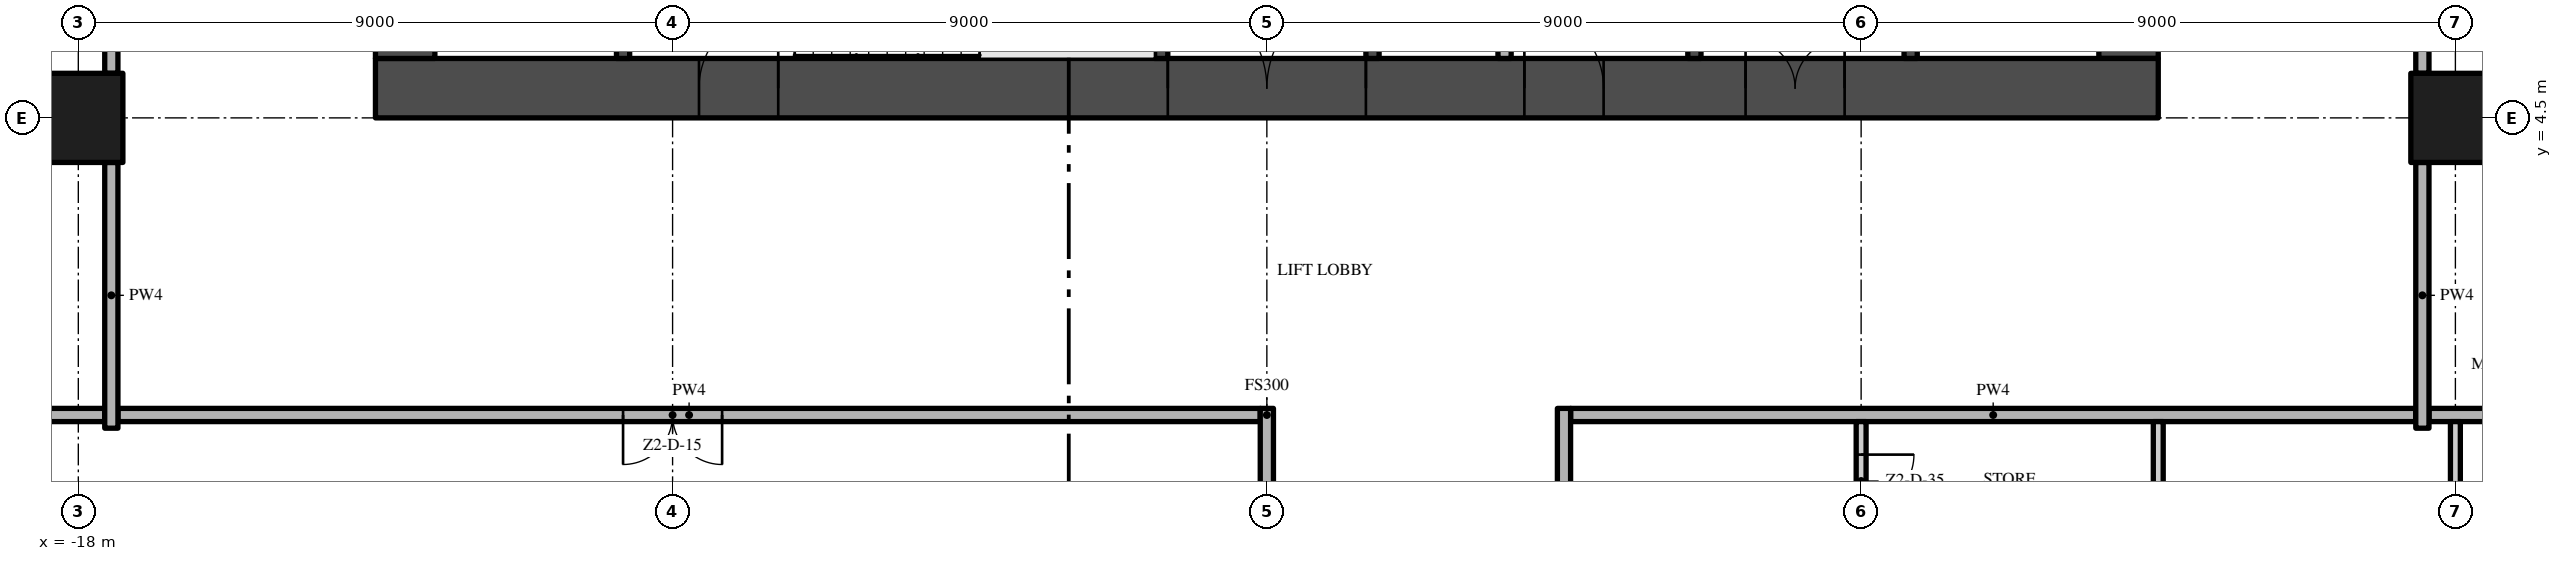
"""IFC4 building model, lengths in metres.
Left out: names, types, materials, properties, quantities, classifications, styles, units other than length and angle.
Written with IfcOpenShell. Run it as: python <this file> out.ifc"""

import sys

from ifc_helpers import new_model, si_unit, direction, frame, frame_2d, origin, origin_2d, place, context, subcontext, project, spatial, rectangle, extrude, element, fill, save


model = new_model("IFC4")
c1 = context("Model", 3, precision=1e-05, world=origin(), true_north=direction((0.0, 1.0)))
c2 = subcontext(c1, "Body", "Model", "MODEL_VIEW")
j1 = project(units=[si_unit("LENGTHUNIT", "METRE"), si_unit("PLANEANGLEUNIT", "RADIAN")], contexts=[c1])
p1 = place(None, origin())
s1 = spatial("IfcSite", under=j1, at=p1, CompositionType="ELEMENT")
p2 = place(p1, origin())
s2 = spatial("IfcBuilding", under=s1, at=p2, CompositionType="ELEMENT")
p3 = place(p2, frame((0.0, 0.0, 111.2)))
s3 = spatial("IfcBuildingStorey", under=s2, at=p3, CompositionType="ELEMENT", Elevation=111.2)
p4 = place(p3, frame((-13.5, 4.95, -0.3), z_axis=(0.0, 0.0, 1.0), x_axis=(1.0, 0.0, 0.0)))
e1 = element("IfcWall", 1, at=p4, inside=s3, PredefinedType="SHEAR", context=c2, shape_type="SweptSolid", body=[
    extrude(rectangle(XDim=27.0, YDim=0.9, at=frame_2d((13.5, 0.0))), origin(), (0.0, 0.0, 1.0), 3.8),
])
p5 = place(p4, frame((12.0, 0.0, 0.3)))
e2 = element("IfcOpeningElement", 2, at=p5, cuts=e1, PredefinedType="OPENING", context=c2, shape_type="SweptSolid", body=[
    extrude(rectangle(XDim=3.0, YDim=2.4, at=frame_2d((1.5, 1.2))), frame((0.0, 0.46, 0.0), z_axis=(0.0, -1.0, 0.0), x_axis=(1.0, 0.0, 0.0)), (0.0, 0.0, 1.0), 0.92),
])
p6 = place(p4, frame((4.9, 0.0, 0.3)))
e3 = element("IfcOpeningElement", 3, at=p6, cuts=e1, PredefinedType="OPENING", context=c2, shape_type="SweptSolid", body=[
    extrude(rectangle(XDim=1.2, YDim=2.2, at=frame_2d((0.6, 1.1))), frame((0.0, 0.46, 0.0), z_axis=(0.0, -1.0, 0.0), x_axis=(1.0, 0.0, 0.0)), (0.0, 0.0, 1.0), 0.92),
])
p7 = place(p4, frame((20.75, 0.0, 0.3)))
e4 = element("IfcOpeningElement", 4, at=p7, cuts=e1, PredefinedType="OPENING", context=c2, shape_type="SweptSolid", body=[
    extrude(rectangle(XDim=1.5, YDim=2.2, at=frame_2d((0.75, 1.1))), frame((0.0, 0.46, 0.0), z_axis=(0.0, -1.0, 0.0), x_axis=(1.0, 0.0, 0.0)), (0.0, 0.0, 1.0), 0.92),
])
p8 = place(p4, frame((17.4, 0.0, 0.3)))
e5 = element("IfcOpeningElement", 5, at=p8, cuts=e1, PredefinedType="OPENING", context=c2, shape_type="SweptSolid", body=[
    extrude(rectangle(XDim=1.2, YDim=2.2, at=frame_2d((0.6, 1.1))), frame((0.0, 0.46, 0.0), z_axis=(0.0, -1.0, 0.0), x_axis=(1.0, 0.0, 0.0)), (0.0, 0.0, 1.0), 0.92),
])
p9 = place(p3, frame((13.05, 5.4, -0.3), z_axis=(0.0, 0.0, 1.0), x_axis=(0.0, 1.0, 0.0)))
e6 = element("IfcWall", 6, at=p9, inside=s3, PredefinedType="SHEAR", context=c2, shape_type="SweptSolid", body=[
    extrude(rectangle(XDim=16.2, YDim=0.9, at=frame_2d((8.1, 0.0))), origin(), (0.0, 0.0, 1.0), 3.8),
])
p10 = place(p9, frame((6.0, 0.0, 0.3)))
e7 = element("IfcOpeningElement", 7, at=p10, cuts=e6, PredefinedType="OPENING", context=c2, shape_type="SweptSolid", body=[
    extrude(rectangle(XDim=1.2, YDim=2.2, at=frame_2d((0.6, 1.1))), frame((0.0, 0.46, 0.0), z_axis=(0.0, -1.0, 0.0), x_axis=(1.0, 0.0, 0.0)), (0.0, 0.0, 1.0), 0.92),
])
p11 = place(p3, frame((-13.05, 21.6, -0.3), z_axis=(0.0, 0.0, 1.0), x_axis=(0.0, -1.0, 0.0)))
e8 = element("IfcWall", 8, at=p11, inside=s3, PredefinedType="SHEAR", context=c2, shape_type="SweptSolid", body=[
    extrude(rectangle(XDim=16.2, YDim=0.9, at=frame_2d((8.1, 0.0))), origin(), (0.0, 0.0, 1.0), 3.8),
])
p12 = place(p11, frame((9.0, 0.0, 0.3)))
e9 = element("IfcOpeningElement", 9, at=p12, cuts=e8, PredefinedType="OPENING", context=c2, shape_type="SweptSolid", body=[
    extrude(rectangle(XDim=1.2, YDim=2.2, at=frame_2d((0.6, 1.1))), frame((0.0, 0.46, 0.0), z_axis=(0.0, -1.0, 0.0), x_axis=(1.0, 0.0, 0.0)), (0.0, 0.0, 1.0), 0.92),
])
for number, where, z_axis, x_axis in (
    (10, (-18.0, 4.5, 0.0), (0.0, 0.0, 1.0), (1.0, 0.0, 0.0)),
    (11, (18.0, 4.5, 0.0), (0.0, 0.0, 1.0), (1.0, 0.0, 0.0)),
):
    element("IfcColumn", number, at=place(p3, frame(where, z_axis=z_axis, x_axis=x_axis)), inside=s3, PredefinedType="COLUMN", context=c2, shape_type="SweptSolid", body=[
        extrude(rectangle(XDim=1.35, YDim=1.35, at=origin_2d()), origin(), (0.0, 0.0, 1.0), 3.5),
    ])
for number, where, z_axis, x_axis in (
    (12, (-9.75, 5.4, 0.0), (0.0, 0.0, 1.0), (0.0, 1.0, 0.0)),
    (13, (-1.6, 5.4, 0.0), (0.0, 0.0, 1.0), (0.0, 1.0, 0.0)),
):
    element("IfcWall", number, at=place(p3, frame(where, z_axis=z_axis, x_axis=x_axis)), inside=s3, PredefinedType="SHEAR", context=c2, shape_type="SweptSolid", body=[
        extrude(rectangle(XDim=2.55, YDim=0.2, at=frame_2d((1.275, 0.0))), origin(), (0.0, 0.0, 1.0), 3.5),
    ])
p13 = place(p3, frame((1.6, 13.5, 0.0), z_axis=(0.0, 0.0, 1.0), x_axis=(0.0, -1.0, 0.0)))
e14 = element("IfcWall", 14, at=p13, inside=s3, PredefinedType="SHEAR", context=c2, shape_type="SweptSolid", body=[
    extrude(rectangle(XDim=8.1, YDim=0.2, at=frame_2d((4.05, 0.0))), origin(), (0.0, 0.0, 1.0), 3.5),
])
p14 = place(p13, frame((3.2, 0.0, 0.0)))
e15 = element("IfcOpeningElement", 15, at=p14, cuts=e14, PredefinedType="OPENING", context=c2, shape_type="SweptSolid", body=[
    extrude(rectangle(XDim=0.9, YDim=2.1, at=frame_2d((0.45, 1.05))), frame((0.0, 0.11, 0.0), z_axis=(0.0, -1.0, 0.0), x_axis=(1.0, 0.0, 0.0)), (0.0, 0.0, 1.0), 0.22),
])
p15 = place(p3, frame((3.6, 13.5, 0.0), z_axis=(0.0, 0.0, 1.0), x_axis=(0.0, -1.0, 0.0)))
e16 = element("IfcWall", 16, at=p15, inside=s3, PredefinedType="PARTITIONING", context=c2, shape_type="SweptSolid", body=[
    extrude(rectangle(XDim=8.1, YDim=0.2, at=frame_2d((4.05, 0.0))), origin(), (0.0, 0.0, 1.0), 3.5),
])
p16 = place(p15, frame((3.6, 0.0, 0.0)))
e17 = element("IfcOpeningElement", 17, at=p16, cuts=e16, PredefinedType="OPENING", context=c2, shape_type="SweptSolid", body=[
    extrude(rectangle(XDim=0.9, YDim=2.1, at=frame_2d((0.45, 1.05))), frame((0.0, 0.11, 0.0), z_axis=(0.0, -1.0, 0.0), x_axis=(1.0, 0.0, 0.0)), (0.0, 0.0, 1.0), 0.22),
])
p17 = place(p3, frame((6.475, 5.4, 0.0), z_axis=(0.0, 0.0, 1.0), x_axis=(0.0, 1.0, 0.0)))
e18 = element("IfcWall", 18, at=p17, inside=s3, PredefinedType="SHEAR", context=c2, shape_type="SweptSolid", body=[
    extrude(rectangle(XDim=6.7, YDim=0.2, at=frame_2d((3.35, 0.0))), origin(), (0.0, 0.0, 1.0), 3.5),
])
p18 = place(p3, frame((9.75, 5.4, 0.0), z_axis=(0.0, 0.0, 1.0), x_axis=(0.0, 1.0, 0.0)))
e19 = element("IfcWall", 19, at=p18, inside=s3, PredefinedType="SHEAR", context=c2, shape_type="SweptSolid", body=[
    extrude(rectangle(XDim=2.2, YDim=0.2, at=frame_2d((1.1, 0.0))), origin(), (0.0, 0.0, 1.0), 3.5),
])
p19 = place(p18, frame((0.55, 0.0, 0.0)))
e20 = element("IfcOpeningElement", 20, at=p19, cuts=e19, PredefinedType="OPENING", context=c2, shape_type="SweptSolid", body=[
    extrude(rectangle(XDim=1.1, YDim=2.1, at=frame_2d((0.55, 1.05))), frame((0.0, 0.11, 0.0), z_axis=(0.0, -1.0, 0.0), x_axis=(1.0, 0.0, 0.0)), (0.0, 0.0, 1.0), 0.22),
])
p20 = place(p3, frame((-0.1, 0.0, 0.0), z_axis=(0.0, 0.0, 1.0), x_axis=(-1.0, 0.0, 0.0)))
e21 = element("IfcWall", 21, at=p20, inside=s3, PredefinedType="PARTITIONING", context=c2, shape_type="SweptSolid", body=[
    extrude(rectangle(XDim=17.3, YDim=0.2, at=frame_2d((8.65, 0.0))), origin(), (0.0, 0.0, 1.0), 3.5),
])
p21 = place(p20, frame((8.15, 0.0, 0.0)))
e22 = element("IfcOpeningElement", 22, at=p21, cuts=e21, PredefinedType="OPENING", context=c2, shape_type="SweptSolid", body=[
    extrude(rectangle(XDim=1.5, YDim=2.4, at=frame_2d((0.75, 1.2))), frame((0.0, 0.11, 0.0), z_axis=(0.0, -1.0, 0.0), x_axis=(1.0, 0.0, 0.0)), (0.0, 0.0, 1.0), 0.22),
])
p22 = place(p3, frame((4.6, 0.0, 0.0), z_axis=(0.0, 0.0, 1.0), x_axis=(1.0, 0.0, 0.0)))
e23 = element("IfcWall", 23, at=p22, inside=s3, PredefinedType="PARTITIONING", context=c2, shape_type="SweptSolid", body=[
    extrude(rectangle(XDim=12.8, YDim=0.2, at=frame_2d((6.4, 0.0))), origin(), (0.0, 0.0, 1.0), 3.5),
])
for number, where, z_axis, x_axis in (
    (24, (-26.7, 0.0, 0.0), (0.0, 0.0, 1.0), (1.0, 0.0, 0.0)),
    (25, (17.6, 0.0, 0.0), (0.0, 0.0, 1.0), (1.0, 0.0, 0.0)),
):
    element("IfcWall", number, at=place(p3, frame(where, z_axis=z_axis, x_axis=x_axis)), inside=s3, PredefinedType="PARTITIONING", context=c2, shape_type="SweptSolid", body=[
        extrude(rectangle(XDim=9.1, YDim=0.2, at=frame_2d((4.55, 0.0))), origin(), (0.0, 0.0, 1.0), 3.5),
    ])
p23 = place(p3, frame((-17.5, -0.2, 0.0), z_axis=(0.0, 0.0, 1.0), x_axis=(0.0, 1.0, 0.0)))
e26 = element("IfcWall", 26, at=p23, inside=s3, PredefinedType="PARTITIONING", context=c2, shape_type="SweptSolid", body=[
    extrude(rectangle(XDim=4.025, YDim=0.2, at=frame_2d((2.013, 0.0))), origin(), (0.0, 0.0, 1.0), 3.5),
])
p24 = place(p3, frame((-17.5, 5.175, 0.0), z_axis=(0.0, 0.0, 1.0), x_axis=(0.0, 1.0, 0.0)))
e27 = element("IfcWall", 27, at=p24, inside=s3, PredefinedType="PARTITIONING", context=c2, shape_type="SweptSolid", body=[
    extrude(rectangle(XDim=7.65, YDim=0.2, at=frame_2d((3.825, 0.0))), origin(), (0.0, 0.0, 1.0), 3.5),
])
p25 = place(p24, frame((3.225, 0.0, 0.0)))
e28 = element("IfcOpeningElement", 28, at=p25, cuts=e27, PredefinedType="OPENING", context=c2, shape_type="SweptSolid", body=[
    extrude(rectangle(XDim=1.2, YDim=2.4, at=frame_2d((0.6, 1.2))), frame((0.0, 0.11, 0.0), z_axis=(0.0, -1.0, 0.0), x_axis=(1.0, 0.0, 0.0)), (0.0, 0.0, 1.0), 0.22),
])
p26 = place(p3, frame((0.0, -3.825, 0.0), z_axis=(0.0, 0.0, 1.0), x_axis=(0.0, 1.0, 0.0)))
e29 = element("IfcWall", 29, at=p26, inside=s3, PredefinedType="PARTITIONING", context=c2, shape_type="SweptSolid", body=[
    extrude(rectangle(XDim=3.925, YDim=0.2, at=frame_2d((1.962, 0.0))), origin(), (0.0, 0.0, 1.0), 3.5),
])
p27 = place(p3, frame((4.5, 0.1, 0.0), z_axis=(0.0, 0.0, 1.0), x_axis=(0.0, -1.0, 0.0)))
e30 = element("IfcWall", 30, at=p27, inside=s3, PredefinedType="PARTITIONING", context=c2, shape_type="SweptSolid", body=[
    extrude(rectangle(XDim=22.3, YDim=0.2, at=frame_2d((11.15, 0.0))), origin(), (0.0, 0.0, 1.0), 3.5),
])
p28 = place(p27, frame((10.6, 0.0, 0.0)))
e31 = element("IfcOpeningElement", 31, at=p28, cuts=e30, PredefinedType="OPENING", context=c2, shape_type="SweptSolid", body=[
    extrude(rectangle(XDim=1.5, YDim=2.4, at=frame_2d((0.75, 1.2))), frame((0.0, 0.11, 0.0), z_axis=(0.0, -1.0, 0.0), x_axis=(1.0, 0.0, 0.0)), (0.0, 0.0, 1.0), 0.22),
])
p29 = place(p3, frame((9.0, -0.1, 0.0), z_axis=(0.0, 0.0, 1.0), x_axis=(0.0, -1.0, 0.0)))
e32 = element("IfcWall", 32, at=p29, inside=s3, PredefinedType="PARTITIONING", context=c2, shape_type="SweptSolid", body=[
    extrude(rectangle(XDim=3.725, YDim=0.15, at=frame_2d((1.863, 0.0))), origin(), (0.0, 0.0, 1.0), 3.5),
])
p30 = place(p29, frame((0.5, 0.0, 0.0)))
e33 = element("IfcOpeningElement", 33, at=p30, cuts=e32, PredefinedType="OPENING", context=c2, shape_type="SweptSolid", body=[
    extrude(rectangle(XDim=0.8, YDim=2.0, at=frame_2d((0.4, 1.0))), frame((0.0, 0.085, 0.0), z_axis=(0.0, -1.0, 0.0), x_axis=(1.0, 0.0, 0.0)), (0.0, 0.0, 1.0), 0.17),
])
p31 = place(p3, frame((13.5, -10.275, 0.0), z_axis=(0.0, 0.0, 1.0), x_axis=(0.0, 1.0, 0.0)))
e34 = element("IfcWall", 34, at=p31, inside=s3, PredefinedType="PARTITIONING", context=c2, shape_type="SweptSolid", body=[
    extrude(rectangle(XDim=10.175, YDim=0.15, at=frame_2d((5.088, 0.0))), origin(), (0.0, 0.0, 1.0), 3.5),
])
p32 = place(p3, frame((17.5, -0.2, 0.0), z_axis=(0.0, 0.0, 1.0), x_axis=(0.0, 1.0, 0.0)))
e35 = element("IfcWall", 35, at=p32, inside=s3, PredefinedType="PARTITIONING", context=c2, shape_type="SweptSolid", body=[
    extrude(rectangle(XDim=4.025, YDim=0.2, at=frame_2d((2.013, 0.0))), origin(), (0.0, 0.0, 1.0), 3.5),
])
p33 = place(p3, frame((17.5, 5.175, 0.0), z_axis=(0.0, 0.0, 1.0), x_axis=(0.0, 1.0, 0.0)))
e36 = element("IfcWall", 36, at=p33, inside=s3, PredefinedType="PARTITIONING", context=c2, shape_type="SweptSolid", body=[
    extrude(rectangle(XDim=7.65, YDim=0.2, at=frame_2d((3.825, 0.0))), origin(), (0.0, 0.0, 1.0), 3.5),
])
p34 = place(p3, frame((18.0, -0.1, 0.0), z_axis=(0.0, 0.0, 1.0), x_axis=(0.0, -1.0, 0.0)))
e37 = element("IfcWall", 37, at=p34, inside=s3, PredefinedType="PARTITIONING", context=c2, shape_type="SweptSolid", body=[
    extrude(rectangle(XDim=3.725, YDim=0.15, at=frame_2d((1.863, 0.0))), origin(), (0.0, 0.0, 1.0), 3.5),
])
p35 = place(p34, frame((2.575, 0.0, 0.0)))
e38 = element("IfcOpeningElement", 38, at=p35, cuts=e37, PredefinedType="OPENING", context=c2, shape_type="SweptSolid", body=[
    extrude(rectangle(XDim=1.0, YDim=2.4, at=frame_2d((0.5, 1.2))), frame((0.0, 0.085, 0.0), z_axis=(0.0, -1.0, 0.0), x_axis=(1.0, 0.0, 0.0)), (0.0, 0.0, 1.0), 0.17),
])
p36 = place(p5, frame((3.0, 0.0, 0.0), z_axis=(0.0, 0.0, 1.0), x_axis=(-1.0, 0.0, 0.0)))
e39 = element("IfcDoor", 39, at=p36, inside=s3, OperationType="DOUBLE_DOOR_SINGLE_SWING", PredefinedType="DOOR", context=c2, shape_type="SweptSolid", body=[
    extrude(rectangle(XDim=3.0, YDim=2.4, at=frame_2d((1.5, 1.2))), frame((0.0, 0.025, 0.0), z_axis=(0.0, -1.0, 0.0), x_axis=(1.0, 0.0, 0.0)), (0.0, 0.0, 1.0), 0.05),
])
fill(e2, e39)
p37 = place(p6, frame((1.2, 0.0, 0.0), z_axis=(0.0, 0.0, 1.0), x_axis=(-1.0, 0.0, 0.0)))
e40 = element("IfcDoor", 40, at=p37, inside=s3, OperationType="SINGLE_SWING_LEFT", PredefinedType="DOOR", context=c2, shape_type="SweptSolid", body=[
    extrude(rectangle(XDim=1.2, YDim=2.2, at=frame_2d((0.6, 1.1))), frame((0.0, 0.025, 0.0), z_axis=(0.0, -1.0, 0.0), x_axis=(1.0, 0.0, 0.0)), (0.0, 0.0, 1.0), 0.05),
])
fill(e3, e40)
p38 = place(p7, frame((1.5, 0.0, 0.0), z_axis=(0.0, 0.0, 1.0), x_axis=(-1.0, 0.0, 0.0)))
e41 = element("IfcDoor", 41, at=p38, inside=s3, OperationType="DOUBLE_DOOR_SINGLE_SWING", PredefinedType="DOOR", context=c2, shape_type="SweptSolid", body=[
    extrude(rectangle(XDim=1.5, YDim=2.2, at=frame_2d((0.75, 1.1))), frame((0.0, 0.025, 0.0), z_axis=(0.0, -1.0, 0.0), x_axis=(1.0, 0.0, 0.0)), (0.0, 0.0, 1.0), 0.05),
])
fill(e4, e41)
p39 = place(p8, frame((1.2, 0.0, 0.0), z_axis=(0.0, 0.0, 1.0), x_axis=(-1.0, 0.0, 0.0)))
e42 = element("IfcDoor", 42, at=p39, inside=s3, OperationType="SINGLE_SWING_RIGHT", PredefinedType="DOOR", context=c2, shape_type="SweptSolid", body=[
    extrude(rectangle(XDim=1.2, YDim=2.2, at=frame_2d((0.6, 1.1))), frame((0.0, 0.025, 0.0), z_axis=(0.0, -1.0, 0.0), x_axis=(1.0, 0.0, 0.0)), (0.0, 0.0, 1.0), 0.05),
])
fill(e5, e42)
p40 = place(p21, origin())
e43 = element("IfcDoor", 43, at=p40, inside=s3, OperationType="DOUBLE_DOOR_SINGLE_SWING", PredefinedType="DOOR", context=c2, shape_type="SweptSolid", body=[
    extrude(rectangle(XDim=1.5, YDim=2.4, at=frame_2d((0.75, 1.2))), frame((0.0, 0.025, 0.0), z_axis=(0.0, -1.0, 0.0), x_axis=(1.0, 0.0, 0.0)), (0.0, 0.0, 1.0), 0.05),
])
fill(e22, e43)
p41 = place(p30, origin())
e44 = element("IfcDoor", 44, at=p41, inside=s3, OperationType="SINGLE_SWING_LEFT", PredefinedType="DOOR", context=c2, shape_type="SweptSolid", body=[
    extrude(rectangle(XDim=0.8, YDim=2.0, at=frame_2d((0.4, 1.0))), frame((0.0, 0.025, 0.0), z_axis=(0.0, -1.0, 0.0), x_axis=(1.0, 0.0, 0.0)), (0.0, 0.0, 1.0), 0.05),
])
fill(e33, e44)
save(model, sys.argv[1])
